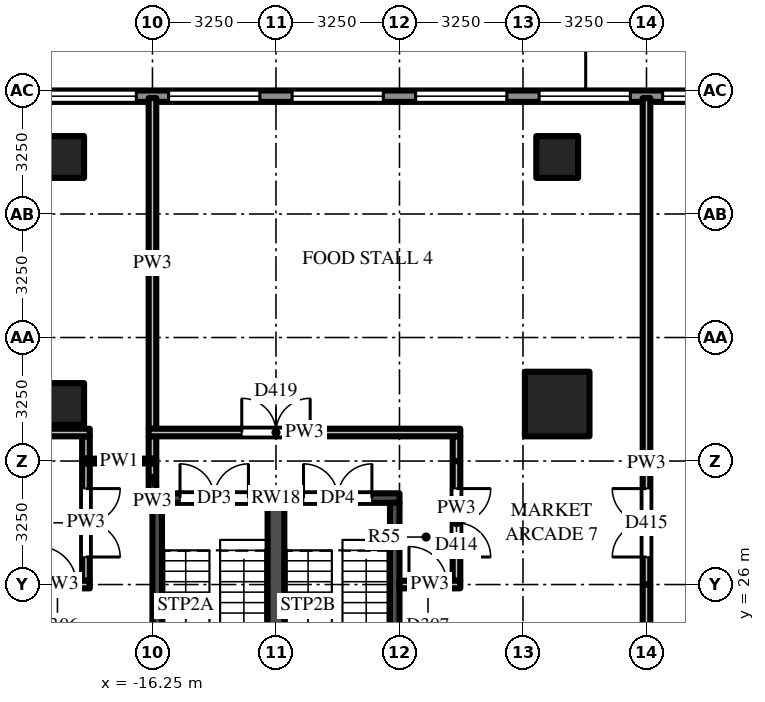
"""IFC4 building model, lengths in metres.
Left out: names, types, materials, properties, quantities, classifications, styles, units other than length and angle.
Written with IfcOpenShell. Run it as: python <this file> out.ifc"""

import sys

from ifc_helpers import new_model, si_unit, direction, frame, frame_2d, origin, origin_2d, place, context, subcontext, project, spatial, rectangle, extrude, source, transform, mapped, element, fill, save


model = new_model("IFC4")
c1 = context("Model", 3, precision=1e-05, world=origin(), true_north=direction((0.0, 1.0)))
c2 = subcontext(c1, "Body", "Model", "MODEL_VIEW")
j1 = project(units=[si_unit("LENGTHUNIT", "METRE"), si_unit("PLANEANGLEUNIT", "RADIAN")], contexts=[c1])
p1 = place(None, origin())
s1 = spatial("IfcSite", under=j1, at=p1, CompositionType="ELEMENT")
p2 = place(p1, origin())
s2 = spatial("IfcBuilding", under=s1, at=p2, CompositionType="ELEMENT")
p3 = place(p2, frame((0.0, 0.0, 14.0)))
s3 = spatial("IfcBuildingStorey", under=s2, at=p3, CompositionType="ELEMENT", Elevation=14.0)
m1 = source(origin(), c2, "Body", "SweptSolid", [
    extrude(rectangle(XDim=1.7, YDim=1.7, at=origin_2d()), origin(), (0.0, 0.0, 1.0), 5.0),
])
p4 = place(p3, frame((-5.6, 30.75, 0.0), z_axis=(0.0, 0.0, 1.0), x_axis=(1.0, 0.0, 0.0)))
e1 = element("IfcColumn", 1, at=p4, inside=s3, PredefinedType="COLUMN", context=c2, shape_type="MappedRepresentation", body=[
    mapped(m1, transform((0.0, 0.0, 0.0))),
])
m2 = source(origin(), c2, "Body", "SweptSolid", [
    extrude(rectangle(XDim=1.1, YDim=1.1, at=origin_2d()), origin(), (0.0, 0.0, 1.0), 5.0),
])
for number, where, z_axis, x_axis in (
    (2, (-5.6, 37.25, 0.0), (0.0, 0.0, 1.0), (1.0, 0.0, 0.0)),
    (3, (-18.6, 30.75, 0.0), (0.0, 0.0, 1.0), (1.0, 0.0, 0.0)),
    (4, (-18.6, 37.25, 0.0), (0.0, 0.0, 1.0), (1.0, 0.0, 0.0)),
):
    element("IfcColumn", number, at=place(p3, frame(where, z_axis=z_axis, x_axis=x_axis)), inside=s3, PredefinedType="COLUMN", context=c2, shape_type="MappedRepresentation", body=[
        mapped(m2, transform((0.0, 0.0, 0.0))),
    ])
m3 = source(origin(), c2, "Body", "SweptSolid", [
    extrude(rectangle(XDim=6.5, YDim=0.25, at=frame_2d((3.25, 0.0))), origin(), (0.0, 0.0, 1.0), 4.7),
])
p5 = place(p3, frame((-16.25, 28.275, 0.0), z_axis=(0.0, 0.0, 1.0), x_axis=(1.0, 0.0, 0.0)))
e5 = element("IfcWall", 5, at=p5, inside=s3, PredefinedType="SHEAR", context=c2, shape_type="MappedRepresentation", body=[
    mapped(m3, transform((0.0, 0.0, 0.0))),
])
m4 = source(origin(), c2, "Body", "SweptSolid", [
    extrude(rectangle(XDim=1.8, YDim=2.1, at=frame_2d((0.9, 1.05))), frame((0.0, 0.135, 0.0), z_axis=(0.0, -1.0, 0.0), x_axis=(1.0, 0.0, 0.0)), (0.0, 0.0, 1.0), 0.27),
])
p6 = place(p5, frame((0.725, 0.0, 0.0)))
e6 = element("IfcOpeningElement", 6, at=p6, cuts=e5, PredefinedType="OPENING", context=c2, shape_type="MappedRepresentation", body=[
    mapped(m4, transform((0.0, 0.0, 0.0))),
])
p7 = place(p5, frame((3.975, 0.0, 0.0)))
e7 = element("IfcOpeningElement", 7, at=p7, cuts=e5, PredefinedType="OPENING", context=c2, shape_type="MappedRepresentation", body=[
    mapped(m4, transform((0.0, 0.0, 0.0))),
])
m5 = source(origin(), c2, "Body", "SweptSolid", [
    extrude(rectangle(XDim=8.3, YDim=0.25, at=frame_2d((4.15, 0.0))), origin(), (0.0, 0.0, 1.0), 4.7),
])
for number, where, z_axis, x_axis in (
    (8, (-16.125, 19.85, 0.0), (0.0, 0.0, 1.0), (0.0, 1.0, 0.0)),
    (9, (-9.875, 19.85, 0.0), (0.0, 0.0, 1.0), (0.0, 1.0, 0.0)),
):
    element("IfcWall", number, at=place(p3, frame(where, z_axis=z_axis, x_axis=x_axis)), inside=s3, PredefinedType="SHEAR", context=c2, shape_type="MappedRepresentation", body=[
        mapped(m5, transform((0.0, 0.0, 0.0))),
    ])
m6 = source(origin(), c2, "Body", "SweptSolid", [
    extrude(rectangle(XDim=8.3, YDim=0.44, at=frame_2d((4.15, 0.0))), origin(), (0.0, 0.0, 1.0), 4.7),
])
p8 = place(p3, frame((-13.0, 19.85, 0.0), z_axis=(0.0, 0.0, 1.0), x_axis=(0.0, 1.0, 0.0)))
e10 = element("IfcWall", 10, at=p8, inside=s3, PredefinedType="SHEAR", context=c2, shape_type="MappedRepresentation", body=[
    mapped(m6, transform((0.0, 0.0, 0.0))),
])
m7 = source(origin(), c2, "Body", "SweptSolid", [
    extrude(rectangle(XDim=71.5, YDim=0.3, at=frame_2d((35.75, 0.0))), origin(), (0.0, 0.0, 1.0), 4.7),
])
p9 = place(p3, frame((35.75, 38.85, 0.0), z_axis=(0.0, 0.0, 1.0), x_axis=(-1.0, 0.0, 0.0)))
e11 = element("IfcWall", 11, at=p9, inside=s3, PredefinedType="SOLIDWALL", context=c2, shape_type="MappedRepresentation", body=[
    mapped(m7, transform((0.0, 0.0, 0.0))),
])
m8 = source(origin(), c2, "Body", "SweptSolid", [
    extrude(rectangle(XDim=2.4, YDim=3.0, at=frame_2d((1.2, 1.5))), frame((0.0, 0.16, 0.0), z_axis=(0.0, -1.0, 0.0), x_axis=(1.0, 0.0, 0.0)), (0.0, 0.0, 1.0), 0.32),
])
p10 = place(p9, frame((0.425, 0.0, 0.9)))
e12 = element("IfcOpeningElement", 12, at=p10, cuts=e11, PredefinedType="OPENING", context=c2, shape_type="MappedRepresentation", body=[
    mapped(m8, transform((0.0, 0.0, 0.0))),
])
p11 = place(p9, frame((3.675, 0.0, 0.9)))
e13 = element("IfcOpeningElement", 13, at=p11, cuts=e11, PredefinedType="OPENING", context=c2, shape_type="MappedRepresentation", body=[
    mapped(m8, transform((0.0, 0.0, 0.0))),
])
p12 = place(p9, frame((6.925, 0.0, 0.9)))
e14 = element("IfcOpeningElement", 14, at=p12, cuts=e11, PredefinedType="OPENING", context=c2, shape_type="MappedRepresentation", body=[
    mapped(m8, transform((0.0, 0.0, 0.0))),
])
p13 = place(p9, frame((10.175, 0.0, 0.9)))
e15 = element("IfcOpeningElement", 15, at=p13, cuts=e11, PredefinedType="OPENING", context=c2, shape_type="MappedRepresentation", body=[
    mapped(m8, transform((0.0, 0.0, 0.0))),
])
m9 = source(origin(), c2, "Body", "SweptSolid", [
    extrude(rectangle(XDim=1.8, YDim=2.4, at=frame_2d((0.9, 1.2))), frame((0.0, 0.16, 0.0), z_axis=(0.0, -1.0, 0.0), x_axis=(1.0, 0.0, 0.0)), (0.0, 0.0, 1.0), 0.32),
])
p14 = place(p9, frame((13.725, 0.0, 0.0)))
e16 = element("IfcOpeningElement", 16, at=p14, cuts=e11, PredefinedType="OPENING", context=c2, shape_type="MappedRepresentation", body=[
    mapped(m9, transform((0.0, 0.0, 0.0))),
])
p15 = place(p9, frame((16.675, 0.0, 0.9)))
e17 = element("IfcOpeningElement", 17, at=p15, cuts=e11, PredefinedType="OPENING", context=c2, shape_type="MappedRepresentation", body=[
    mapped(m8, transform((0.0, 0.0, 0.0))),
])
p16 = place(p9, frame((19.925, 0.0, 0.9)))
e18 = element("IfcOpeningElement", 18, at=p16, cuts=e11, PredefinedType="OPENING", context=c2, shape_type="MappedRepresentation", body=[
    mapped(m8, transform((0.0, 0.0, 0.0))),
])
p17 = place(p9, frame((23.175, 0.0, 0.9)))
e19 = element("IfcOpeningElement", 19, at=p17, cuts=e11, PredefinedType="OPENING", context=c2, shape_type="MappedRepresentation", body=[
    mapped(m8, transform((0.0, 0.0, 0.0))),
])
p18 = place(p9, frame((26.425, 0.0, 0.9)))
e20 = element("IfcOpeningElement", 20, at=p18, cuts=e11, PredefinedType="OPENING", context=c2, shape_type="MappedRepresentation", body=[
    mapped(m8, transform((0.0, 0.0, 0.0))),
])
p19 = place(p9, frame((29.675, 0.0, 0.9)))
e21 = element("IfcOpeningElement", 21, at=p19, cuts=e11, PredefinedType="OPENING", context=c2, shape_type="MappedRepresentation", body=[
    mapped(m8, transform((0.0, 0.0, 0.0))),
])
p20 = place(p9, frame((32.925, 0.0, 0.9)))
e22 = element("IfcOpeningElement", 22, at=p20, cuts=e11, PredefinedType="OPENING", context=c2, shape_type="MappedRepresentation", body=[
    mapped(m8, transform((0.0, 0.0, 0.0))),
])
p21 = place(p9, frame((36.175, 0.0, 0.9)))
e23 = element("IfcOpeningElement", 23, at=p21, cuts=e11, PredefinedType="OPENING", context=c2, shape_type="MappedRepresentation", body=[
    mapped(m8, transform((0.0, 0.0, 0.0))),
])
p22 = place(p9, frame((39.425, 0.0, 0.9)))
e24 = element("IfcOpeningElement", 24, at=p22, cuts=e11, PredefinedType="OPENING", context=c2, shape_type="MappedRepresentation", body=[
    mapped(m8, transform((0.0, 0.0, 0.0))),
])
p23 = place(p9, frame((42.675, 0.0, 0.9)))
e25 = element("IfcOpeningElement", 25, at=p23, cuts=e11, PredefinedType="OPENING", context=c2, shape_type="MappedRepresentation", body=[
    mapped(m8, transform((0.0, 0.0, 0.0))),
])
p24 = place(p9, frame((45.925, 0.0, 0.9)))
e26 = element("IfcOpeningElement", 26, at=p24, cuts=e11, PredefinedType="OPENING", context=c2, shape_type="MappedRepresentation", body=[
    mapped(m8, transform((0.0, 0.0, 0.0))),
])
p25 = place(p9, frame((49.175, 0.0, 0.9)))
e27 = element("IfcOpeningElement", 27, at=p25, cuts=e11, PredefinedType="OPENING", context=c2, shape_type="MappedRepresentation", body=[
    mapped(m8, transform((0.0, 0.0, 0.0))),
])
p26 = place(p9, frame((52.425, 0.0, 0.9)))
e28 = element("IfcOpeningElement", 28, at=p26, cuts=e11, PredefinedType="OPENING", context=c2, shape_type="MappedRepresentation", body=[
    mapped(m8, transform((0.0, 0.0, 0.0))),
])
p27 = place(p9, frame((55.675, 0.0, 0.9)))
e29 = element("IfcOpeningElement", 29, at=p27, cuts=e11, PredefinedType="OPENING", context=c2, shape_type="MappedRepresentation", body=[
    mapped(m8, transform((0.0, 0.0, 0.0))),
])
p28 = place(p9, frame((58.925, 0.0, 0.9)))
e30 = element("IfcOpeningElement", 30, at=p28, cuts=e11, PredefinedType="OPENING", context=c2, shape_type="MappedRepresentation", body=[
    mapped(m8, transform((0.0, 0.0, 0.0))),
])
p29 = place(p9, frame((62.175, 0.0, 0.9)))
e31 = element("IfcOpeningElement", 31, at=p29, cuts=e11, PredefinedType="OPENING", context=c2, shape_type="MappedRepresentation", body=[
    mapped(m8, transform((0.0, 0.0, 0.0))),
])
p30 = place(p9, frame((65.425, 0.0, 0.9)))
e32 = element("IfcOpeningElement", 32, at=p30, cuts=e11, PredefinedType="OPENING", context=c2, shape_type="MappedRepresentation", body=[
    mapped(m8, transform((0.0, 0.0, 0.0))),
])
p31 = place(p9, frame((68.675, 0.0, 0.9)))
e33 = element("IfcOpeningElement", 33, at=p31, cuts=e11, PredefinedType="OPENING", context=c2, shape_type="MappedRepresentation", body=[
    mapped(m8, transform((0.0, 0.0, 0.0))),
])
m10 = source(origin(), c2, "Body", "SweptSolid", [
    extrude(rectangle(XDim=3.087, YDim=0.2, at=frame_2d((1.544, 0.0))), origin(), (0.0, 0.0, 1.0), 4.274),
])
p32 = place(p3, frame((-18.0, 29.188, 0.0), z_axis=(0.0, 0.0, 1.0), x_axis=(0.0, -1.0, 0.0)))
e34 = element("IfcWall", 34, at=p32, inside=s3, PredefinedType="PARTITIONING", context=c2, shape_type="MappedRepresentation", body=[
    mapped(m10, transform((0.0, 0.0, 0.0))),
])
m11 = source(origin(), c2, "Body", "SweptSolid", [
    extrude(rectangle(XDim=1.8, YDim=2.1, at=frame_2d((0.9, 1.05))), frame((0.0, 0.11, 0.0), z_axis=(0.0, -1.0, 0.0), x_axis=(1.0, 0.0, 0.0)), (0.0, 0.0, 1.0), 0.22),
])
p33 = place(p32, frame((0.663, 0.0, 0.0)))
e35 = element("IfcOpeningElement", 35, at=p33, cuts=e34, PredefinedType="OPENING", context=c2, shape_type="MappedRepresentation", body=[
    mapped(m11, transform((0.0, 0.0, 0.0))),
])
m12 = source(origin(), c2, "Body", "SweptSolid", [
    extrude(rectangle(XDim=0.587, YDim=0.2, at=frame_2d((0.294, 0.0))), origin(), (0.0, 0.0, 1.0), 4.7),
])
p34 = place(p3, frame((-18.0, 29.312, 0.0), z_axis=(0.0, 0.0, 1.0), x_axis=(0.0, 1.0, 0.0)))
e36 = element("IfcWall", 36, at=p34, inside=s3, PredefinedType="PARTITIONING", context=c2, shape_type="MappedRepresentation", body=[
    mapped(m12, transform((0.0, 0.0, 0.0))),
])
m13 = source(origin(), c2, "Body", "SweptSolid", [
    extrude(rectangle(XDim=0.788, YDim=0.2, at=frame_2d((0.394, 0.0))), origin(), (0.0, 0.0, 1.0), 4.7),
])
p35 = place(p3, frame((-16.25, 28.4, 0.0), z_axis=(0.0, 0.0, 1.0), x_axis=(0.0, 1.0, 0.0)))
e37 = element("IfcWall", 37, at=p35, inside=s3, PredefinedType="PARTITIONING", context=c2, shape_type="MappedRepresentation", body=[
    mapped(m13, transform((0.0, 0.0, 0.0))),
])
m14 = source(origin(), c2, "Body", "SweptSolid", [
    extrude(rectangle(XDim=8.7, YDim=0.2, at=frame_2d((4.35, 0.0))), origin(), (0.0, 0.0, 1.0), 3.762),
])
p36 = place(p3, frame((-16.25, 30.1, 0.0), z_axis=(0.0, 0.0, 1.0), x_axis=(0.0, 1.0, 0.0)))
e38 = element("IfcWall", 38, at=p36, inside=s3, PredefinedType="PARTITIONING", context=c2, shape_type="MappedRepresentation", body=[
    mapped(m14, transform((0.0, 0.0, 0.0))),
])
p37 = place(p3, frame((-16.25, 29.312, 0.0), z_axis=(0.0, 0.0, 1.0), x_axis=(0.0, 1.0, 0.0)))
e39 = element("IfcWall", 39, at=p37, inside=s3, PredefinedType="PARTITIONING", context=c2, shape_type="MappedRepresentation", body=[
    mapped(m12, transform((0.0, 0.0, 0.0))),
])
m15 = source(origin(), c2, "Body", "SweptSolid", [
    extrude(rectangle(XDim=3.15, YDim=0.2, at=frame_2d((1.575, 0.0))), origin(), (0.0, 0.0, 1.0), 4.274),
])
p38 = place(p3, frame((-8.25, 29.25, 0.0), z_axis=(0.0, 0.0, 1.0), x_axis=(0.0, -1.0, 0.0)))
e40 = element("IfcWall", 40, at=p38, inside=s3, PredefinedType="PARTITIONING", context=c2, shape_type="MappedRepresentation", body=[
    mapped(m15, transform((0.0, 0.0, 0.0))),
])
p39 = place(p38, frame((0.725, 0.0, 0.0)))
e41 = element("IfcOpeningElement", 41, at=p39, cuts=e40, PredefinedType="OPENING", context=c2, shape_type="MappedRepresentation", body=[
    mapped(m11, transform((0.0, 0.0, 0.0))),
])
m16 = source(origin(), c2, "Body", "SweptSolid", [
    extrude(rectangle(XDim=0.65, YDim=0.2, at=frame_2d((0.325, 0.0))), origin(), (0.0, 0.0, 1.0), 4.7),
])
p40 = place(p3, frame((-8.25, 29.25, 0.0), z_axis=(0.0, 0.0, 1.0), x_axis=(0.0, 1.0, 0.0)))
e42 = element("IfcWall", 42, at=p40, inside=s3, PredefinedType="PARTITIONING", context=c2, shape_type="MappedRepresentation", body=[
    mapped(m16, transform((0.0, 0.0, 0.0))),
])
m17 = source(origin(), c2, "Body", "SweptSolid", [
    extrude(rectangle(XDim=3.25, YDim=0.2, at=frame_2d((1.625, 0.0))), origin(), (0.0, 0.0, 1.0), 4.7),
])
p41 = place(p3, frame((-3.25, 26.0, 0.0), z_axis=(0.0, 0.0, 1.0), x_axis=(0.0, 1.0, 0.0)))
e43 = element("IfcWall", 43, at=p41, inside=s3, PredefinedType="PARTITIONING", context=c2, shape_type="MappedRepresentation", body=[
    mapped(m17, transform((0.0, 0.0, 0.0))),
])
p42 = place(p41, frame((0.725, 0.0, 0.0)))
e44 = element("IfcOpeningElement", 44, at=p42, cuts=e43, PredefinedType="OPENING", context=c2, shape_type="MappedRepresentation", body=[
    mapped(m11, transform((0.0, 0.0, 0.0))),
])
m18 = source(origin(), c2, "Body", "SweptSolid", [
    extrude(rectangle(XDim=6.4, YDim=0.2, at=frame_2d((3.2, 0.0))), origin(), (0.0, 0.0, 1.0), 4.7),
])
p43 = place(p3, frame((-3.25, 26.0, 0.0), z_axis=(0.0, 0.0, 1.0), x_axis=(0.0, -1.0, 0.0)))
e45 = element("IfcWall", 45, at=p43, inside=s3, PredefinedType="PARTITIONING", context=c2, shape_type="MappedRepresentation", body=[
    mapped(m18, transform((0.0, 0.0, 0.0))),
])
m19 = source(origin(), c2, "Body", "SweptSolid", [
    extrude(rectangle(XDim=9.55, YDim=0.2, at=frame_2d((4.775, 0.0))), origin(), (0.0, 0.0, 1.0), 3.918),
])
p44 = place(p3, frame((-3.25, 29.25, 0.0), z_axis=(0.0, 0.0, 1.0), x_axis=(0.0, 1.0, 0.0)))
e46 = element("IfcWall", 46, at=p44, inside=s3, PredefinedType="PARTITIONING", context=c2, shape_type="MappedRepresentation", body=[
    mapped(m19, transform((0.0, 0.0, 0.0))),
])
m20 = source(origin(), c2, "Body", "SweptSolid", [
    extrude(rectangle(XDim=1.6, YDim=0.2, at=frame_2d((0.8, 0.0))), origin(), (0.0, 0.0, 1.0), 3.762),
])
p45 = place(p3, frame((-19.5, 26.0, 0.0), z_axis=(0.0, 0.0, 1.0), x_axis=(1.0, 0.0, 0.0)))
e47 = element("IfcWall", 47, at=p45, inside=s3, PredefinedType="PARTITIONING", context=c2, shape_type="MappedRepresentation", body=[
    mapped(m20, transform((0.0, 0.0, 0.0))),
])
m21 = source(origin(), c2, "Body", "SweptSolid", [
    extrude(rectangle(XDim=1.0, YDim=2.1, at=frame_2d((0.5, 1.05))), frame((0.0, 0.11, 0.0), z_axis=(0.0, -1.0, 0.0), x_axis=(1.0, 0.0, 0.0)), (0.0, 0.0, 1.0), 0.22),
])
p46 = place(p45, frame((0.25, 0.0, 0.0)))
e48 = element("IfcOpeningElement", 48, at=p46, cuts=e47, PredefinedType="OPENING", context=c2, shape_type="MappedRepresentation", body=[
    mapped(m21, transform((0.0, 0.0, 0.0))),
])
m22 = source(origin(), c2, "Body", "SweptSolid", [
    extrude(rectangle(XDim=1.6, YDim=0.2, at=frame_2d((0.8, 0.0))), origin(), (0.0, 0.0, 1.0), 4.7),
])
p47 = place(p3, frame((-9.75, 26.0, 0.0), z_axis=(0.0, 0.0, 1.0), x_axis=(1.0, 0.0, 0.0)))
e49 = element("IfcWall", 49, at=p47, inside=s3, PredefinedType="PARTITIONING", context=c2, shape_type="MappedRepresentation", body=[
    mapped(m22, transform((0.0, 0.0, 0.0))),
])
p48 = place(p47, frame((0.25, 0.0, 0.0)))
e50 = element("IfcOpeningElement", 50, at=p48, cuts=e49, PredefinedType="OPENING", context=c2, shape_type="MappedRepresentation", body=[
    mapped(m21, transform((0.0, 0.0, 0.0))),
])
m23 = source(origin(), c2, "Body", "SweptSolid", [
    extrude(rectangle(XDim=1.95, YDim=0.125, at=frame_2d((0.975, 0.0))), origin(), (0.0, 0.0, 1.0), 4.7),
])
p49 = place(p3, frame((-18.1, 29.25, 0.0), z_axis=(0.0, 0.0, 1.0), x_axis=(1.0, 0.0, 0.0)))
e51 = element("IfcWall", 51, at=p49, inside=s3, PredefinedType="PARTITIONING", context=c2, shape_type="MappedRepresentation", body=[
    mapped(m23, transform((0.0, 0.0, 0.0))),
])
m24 = source(origin(), c2, "Body", "SweptSolid", [
    extrude(rectangle(XDim=8.2, YDim=0.2, at=frame_2d((4.1, 0.0))), origin(), (0.0, 0.0, 1.0), 3.762),
])
p50 = place(p3, frame((-26.1, 30.0, 0.0), z_axis=(0.0, 0.0, 1.0), x_axis=(1.0, 0.0, 0.0)))
e52 = element("IfcWall", 52, at=p50, inside=s3, PredefinedType="PARTITIONING", context=c2, shape_type="MappedRepresentation", body=[
    mapped(m24, transform((0.0, 0.0, 0.0))),
])
m25 = source(origin(), c2, "Body", "SweptSolid", [
    extrude(rectangle(XDim=8.2, YDim=0.2, at=frame_2d((4.1, 0.0))), origin(), (0.0, 0.0, 1.0), 4.7),
])
p51 = place(p3, frame((-16.35, 30.0, 0.0), z_axis=(0.0, 0.0, 1.0), x_axis=(1.0, 0.0, 0.0)))
e53 = element("IfcWall", 53, at=p51, inside=s3, PredefinedType="PARTITIONING", context=c2, shape_type="MappedRepresentation", body=[
    mapped(m25, transform((0.0, 0.0, 0.0))),
])
p52 = place(p51, frame((2.45, 0.0, 0.0)))
e54 = element("IfcOpeningElement", 54, at=p52, cuts=e53, PredefinedType="OPENING", context=c2, shape_type="MappedRepresentation", body=[
    mapped(m11, transform((0.0, 0.0, 0.0))),
])
m26 = source(origin(), c2, "Body", "SweptSolid", [
    extrude(rectangle(XDim=1.8, YDim=2.1, at=frame_2d((0.9, 1.05))), frame((0.0, 0.025, 0.0), z_axis=(0.0, -1.0, 0.0), x_axis=(1.0, 0.0, 0.0)), (0.0, 0.0, 1.0), 0.05),
])
p53 = place(p6, origin())
e55 = element("IfcDoor", 55, at=p53, inside=s3, OperationType="DOUBLE_DOOR_SINGLE_SWING", PredefinedType="DOOR", context=c2, shape_type="MappedRepresentation", body=[
    mapped(m26, transform((0.0, 0.0, 0.0))),
])
fill(e6, e55)
p54 = place(p7, origin())
e56 = element("IfcDoor", 56, at=p54, inside=s3, OperationType="DOUBLE_DOOR_SINGLE_SWING", PredefinedType="DOOR", context=c2, shape_type="MappedRepresentation", body=[
    mapped(m26, transform((0.0, 0.0, 0.0))),
])
fill(e7, e56)
m27 = source(origin(), c2, "Body", "SweptSolid", [
    extrude(rectangle(XDim=2.4, YDim=3.0, at=frame_2d((1.2, 1.5))), frame((0.0, 0.03, 0.0), z_axis=(0.0, -1.0, 0.0), x_axis=(1.0, 0.0, 0.0)), (0.0, 0.0, 1.0), 0.06),
])
p55 = place(p21, origin())
e57 = element("IfcWindow", 57, at=p55, inside=s3, PartitioningType="SINGLE_PANEL", PredefinedType="WINDOW", context=c2, shape_type="MappedRepresentation", body=[
    mapped(m27, transform((0.0, 0.0, 0.0))),
])
fill(e23, e57)
p56 = place(p22, origin())
e58 = element("IfcWindow", 58, at=p56, inside=s3, PartitioningType="SINGLE_PANEL", PredefinedType="WINDOW", context=c2, shape_type="MappedRepresentation", body=[
    mapped(m27, transform((0.0, 0.0, 0.0))),
])
fill(e24, e58)
p57 = place(p23, origin())
e59 = element("IfcWindow", 59, at=p57, inside=s3, PartitioningType="SINGLE_PANEL", PredefinedType="WINDOW", context=c2, shape_type="MappedRepresentation", body=[
    mapped(m27, transform((0.0, 0.0, 0.0))),
])
fill(e25, e59)
p58 = place(p24, origin())
e60 = element("IfcWindow", 60, at=p58, inside=s3, PartitioningType="SINGLE_PANEL", PredefinedType="WINDOW", context=c2, shape_type="MappedRepresentation", body=[
    mapped(m27, transform((0.0, 0.0, 0.0))),
])
fill(e26, e60)
p59 = place(p25, origin())
e61 = element("IfcWindow", 61, at=p59, inside=s3, PartitioningType="SINGLE_PANEL", PredefinedType="WINDOW", context=c2, shape_type="MappedRepresentation", body=[
    mapped(m27, transform((0.0, 0.0, 0.0))),
])
fill(e27, e61)
p60 = place(p26, origin())
e62 = element("IfcWindow", 62, at=p60, inside=s3, PartitioningType="SINGLE_PANEL", PredefinedType="WINDOW", context=c2, shape_type="MappedRepresentation", body=[
    mapped(m27, transform((0.0, 0.0, 0.0))),
])
fill(e28, e62)
m28 = source(origin(), c2, "Body", "SweptSolid", [
    extrude(rectangle(XDim=1.0, YDim=2.1, at=frame_2d((0.5, 1.05))), frame((0.0, 0.025, 0.0), z_axis=(0.0, -1.0, 0.0), x_axis=(1.0, 0.0, 0.0)), (0.0, 0.0, 1.0), 0.05),
])
p61 = place(p46, origin())
e63 = element("IfcDoor", 63, at=p61, inside=s3, OperationType="SINGLE_SWING_LEFT", PredefinedType="DOOR", context=c2, shape_type="MappedRepresentation", body=[
    mapped(m28, transform((0.0, 0.0, 0.0))),
])
fill(e48, e63)
p62 = place(p48, origin())
e64 = element("IfcDoor", 64, at=p62, inside=s3, OperationType="SINGLE_SWING_LEFT", PredefinedType="DOOR", context=c2, shape_type="MappedRepresentation", body=[
    mapped(m28, transform((0.0, 0.0, 0.0))),
])
fill(e50, e64)
p63 = place(p33, origin())
e65 = element("IfcDoor", 65, at=p63, inside=s3, OperationType="DOUBLE_DOOR_SINGLE_SWING", PredefinedType="DOOR", context=c2, shape_type="MappedRepresentation", body=[
    mapped(m26, transform((0.0, 0.0, 0.0))),
])
fill(e35, e65)
p64 = place(p39, origin())
e66 = element("IfcDoor", 66, at=p64, inside=s3, OperationType="DOUBLE_DOOR_SINGLE_SWING", PredefinedType="DOOR", context=c2, shape_type="MappedRepresentation", body=[
    mapped(m26, transform((0.0, 0.0, 0.0))),
])
fill(e41, e66)
p65 = place(p42, origin())
e67 = element("IfcDoor", 67, at=p65, inside=s3, OperationType="DOUBLE_DOOR_SINGLE_SWING", PredefinedType="DOOR", context=c2, shape_type="MappedRepresentation", body=[
    mapped(m26, transform((0.0, 0.0, 0.0))),
])
fill(e44, e67)
p66 = place(p52, origin())
e68 = element("IfcDoor", 68, at=p66, inside=s3, OperationType="DOUBLE_DOOR_SINGLE_SWING", PredefinedType="DOOR", context=c2, shape_type="MappedRepresentation", body=[
    mapped(m26, transform((0.0, 0.0, 0.0))),
])
fill(e54, e68)
save(model, sys.argv[1])
